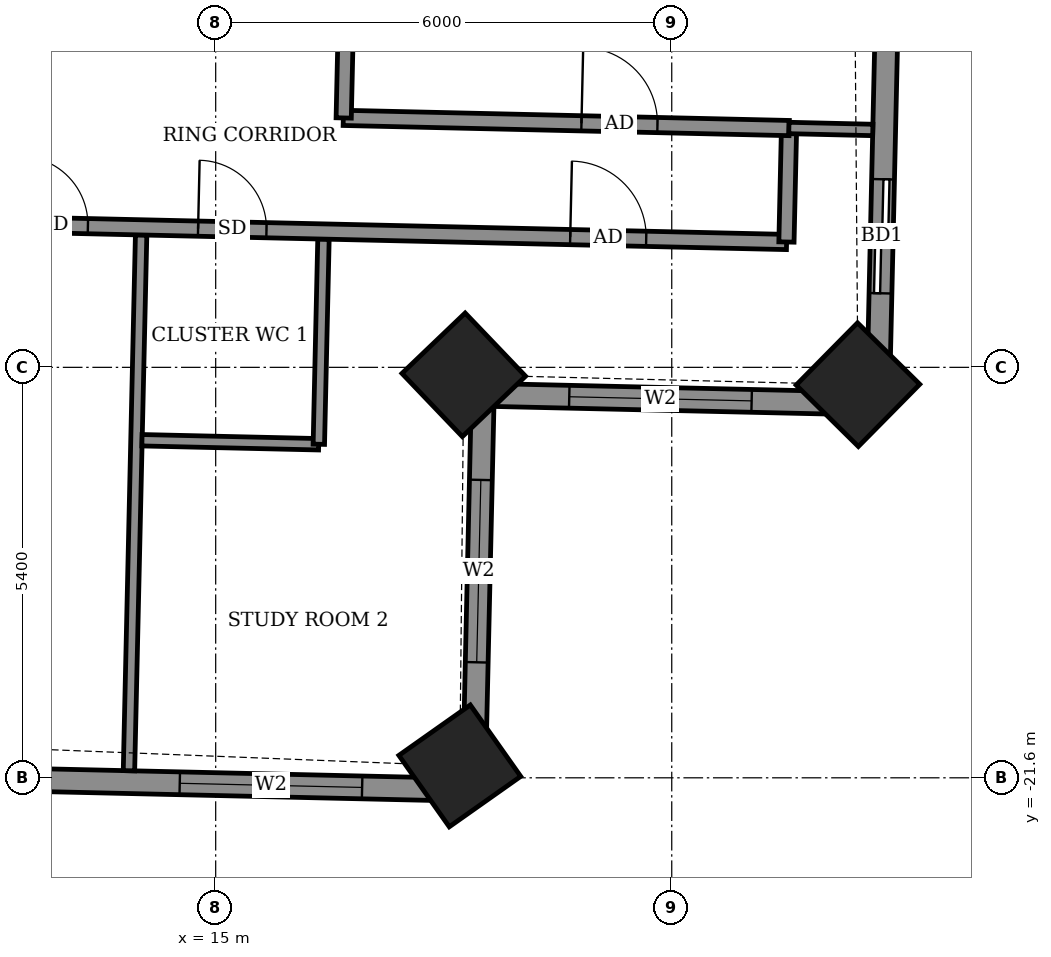
"""IFC4 building model, lengths in metres.
Left out: names, types, materials, properties, quantities, classifications, styles, units other than length and angle.
Written with IfcOpenShell. Run it as: python <this file> out.ifc"""

import sys

from ifc_helpers import new_model, si_unit, direction, frame, frame_2d, origin, origin_2d, place, context, subcontext, project, spatial, rectangle, extrude, element, fill, save


model = new_model("IFC4")
c1 = context("Model", 3, precision=1e-05, world=origin(), true_north=direction((0.0, 1.0)))
c2 = subcontext(c1, "Body", "Model", "MODEL_VIEW")
j1 = project(units=[si_unit("LENGTHUNIT", "METRE"), si_unit("PLANEANGLEUNIT", "RADIAN")], contexts=[c1])
p1 = place(None, origin())
s1 = spatial("IfcSite", under=j1, at=p1, CompositionType="ELEMENT")
p2 = place(p1, origin())
s2 = spatial("IfcBuilding", under=s1, at=p2, CompositionType="ELEMENT")
p3 = place(p2, frame((0.0, 0.0, 201.5)))
s3 = spatial("IfcBuildingStorey", under=s2, at=p3, CompositionType="ELEMENT", Elevation=201.5)
for number, where, z_axis, x_axis in (
    (1, (18.211, -21.443, -0.55), (0.0, 0.0, 1.0), (0.817, 0.577, 0.0)),
    (2, (18.264, -16.298, -0.55), (0.0, 0.0, 1.0), (0.723, 0.691, 0.0)),
    (3, (23.45, -16.428, -0.55), (0.0, 0.0, 1.0), (0.702, 0.712, 0.0)),
):
    element("IfcColumn", number, at=place(p3, frame(where, z_axis=z_axis, x_axis=x_axis)), inside=s3, PredefinedType="COLUMN", context=c2, shape_type="SweptSolid", body=[
        extrude(rectangle(XDim=1.15, YDim=1.15, at=origin_2d()), origin(), (0.0, 0.0, 1.0), 3.6),
    ])
p4 = place(p3, frame((23.713, -16.679, 0.0), z_axis=(0.0, 0.0, 1.0), x_axis=(0.02269451316, 0.999742446369, 0.0)))
e4 = element("IfcWall", 4, at=p4, inside=s3, PredefinedType="SOLIDWALL", context=c2, shape_type="SweptSolid", body=[
    extrude(rectangle(XDim=10.93, YDim=0.3, at=frame_2d((5.465, 0.0))), origin(), (0.0, 0.0, 1.0), 2.55),
])
p5 = place(p4, frame((1.454, 0.0, 0.0)))
e5 = element("IfcOpeningElement", 5, at=p5, cuts=e4, PredefinedType="OPENING", context=c2, shape_type="SweptSolid", body=[
    extrude(rectangle(XDim=1.5, YDim=2.4, at=frame_2d((0.75, 1.2))), frame((0.0, 0.16, 0.0), z_axis=(0.0, -1.0, 0.0), x_axis=(1.0, 0.0, 0.0)), (0.0, 0.0, 1.0), 0.32),
])
p6 = place(p4, frame((6.589, 0.0, 0.9)))
e6 = element("IfcOpeningElement", 6, at=p6, cuts=e4, PredefinedType="OPENING", context=c2, shape_type="SweptSolid", body=[
    extrude(rectangle(XDim=1.2, YDim=1.5, at=frame_2d((0.6, 0.75))), frame((0.0, 0.16, 0.0), z_axis=(0.0, -1.0, 0.0), x_axis=(1.0, 0.0, 0.0)), (0.0, 0.0, 1.0), 0.32),
])
p7 = place(p3, frame((-23.437, -20.81, 0.0), z_axis=(0.0, 0.0, 1.0), x_axis=(0.999742269115, -0.022702320244, 0.0)))
e7 = element("IfcWall", 7, at=p7, inside=s3, PredefinedType="SOLIDWALL", context=c2, shape_type="SweptSolid", body=[
    extrude(rectangle(XDim=41.844, YDim=0.3, at=frame_2d((20.922, 0.0))), origin(), (0.0, 0.0, 1.0), 2.55),
])
p8 = place(p7, frame((1.899, 0.0, 0.0)))
e8 = element("IfcOpeningElement", 8, at=p8, cuts=e7, PredefinedType="OPENING", context=c2, shape_type="SweptSolid", body=[
    extrude(rectangle(XDim=1.5, YDim=2.4, at=frame_2d((0.75, 1.2))), frame((0.0, 0.16, 0.0), z_axis=(0.0, -1.0, 0.0), x_axis=(1.0, 0.0, 0.0)), (0.0, 0.0, 1.0), 0.32),
])
p9 = place(p7, frame((7.575, 0.0, 0.0)))
e9 = element("IfcOpeningElement", 9, at=p9, cuts=e7, PredefinedType="OPENING", context=c2, shape_type="SweptSolid", body=[
    extrude(rectangle(XDim=1.2, YDim=2.4, at=frame_2d((0.6, 1.2))), frame((0.0, 0.16, 0.0), z_axis=(0.0, -1.0, 0.0), x_axis=(1.0, 0.0, 0.0)), (0.0, 0.0, 1.0), 0.32),
])
p10 = place(p7, frame((10.612, 0.0, 0.0)))
e10 = element("IfcOpeningElement", 10, at=p10, cuts=e7, PredefinedType="OPENING", context=c2, shape_type="SweptSolid", body=[
    extrude(rectangle(XDim=1.5, YDim=2.4, at=frame_2d((0.75, 1.2))), frame((0.0, 0.16, 0.0), z_axis=(0.0, -1.0, 0.0), x_axis=(1.0, 0.0, 0.0)), (0.0, 0.0, 1.0), 0.32),
])
p11 = place(p7, frame((15.762, 0.0, 0.0)))
e11 = element("IfcOpeningElement", 11, at=p11, cuts=e7, PredefinedType="OPENING", context=c2, shape_type="SweptSolid", body=[
    extrude(rectangle(XDim=1.5, YDim=2.4, at=frame_2d((0.75, 1.2))), frame((0.0, 0.16, 0.0), z_axis=(0.0, -1.0, 0.0), x_axis=(1.0, 0.0, 0.0)), (0.0, 0.0, 1.0), 0.32),
])
p12 = place(p7, frame((21.648, 0.0, 0.0)))
e12 = element("IfcOpeningElement", 12, at=p12, cuts=e7, PredefinedType="OPENING", context=c2, shape_type="SweptSolid", body=[
    extrude(rectangle(XDim=1.2, YDim=2.4, at=frame_2d((0.6, 1.2))), frame((0.0, 0.16, 0.0), z_axis=(0.0, -1.0, 0.0), x_axis=(1.0, 0.0, 0.0)), (0.0, 0.0, 1.0), 0.32),
])
p13 = place(p7, frame((24.685, 0.0, 0.0)))
e13 = element("IfcOpeningElement", 13, at=p13, cuts=e7, PredefinedType="OPENING", context=c2, shape_type="SweptSolid", body=[
    extrude(rectangle(XDim=1.5, YDim=2.4, at=frame_2d((0.75, 1.2))), frame((0.0, 0.16, 0.0), z_axis=(0.0, -1.0, 0.0), x_axis=(1.0, 0.0, 0.0)), (0.0, 0.0, 1.0), 0.32),
])
p14 = place(p7, frame((29.685, 0.0, 0.0)))
e14 = element("IfcOpeningElement", 14, at=p14, cuts=e7, PredefinedType="OPENING", context=c2, shape_type="SweptSolid", body=[
    extrude(rectangle(XDim=1.5, YDim=2.4, at=frame_2d((0.75, 1.2))), frame((0.0, 0.16, 0.0), z_axis=(0.0, -1.0, 0.0), x_axis=(1.0, 0.0, 0.0)), (0.0, 0.0, 1.0), 0.32),
])
p15 = place(p7, frame((33.022, 0.0, 0.0)))
e15 = element("IfcOpeningElement", 15, at=p15, cuts=e7, PredefinedType="OPENING", context=c2, shape_type="SweptSolid", body=[
    extrude(rectangle(XDim=1.2, YDim=2.4, at=frame_2d((0.6, 1.2))), frame((0.0, 0.16, 0.0), z_axis=(0.0, -1.0, 0.0), x_axis=(1.0, 0.0, 0.0)), (0.0, 0.0, 1.0), 0.32),
])
p16 = place(p7, frame((37.974, 0.0, 0.9)))
e16 = element("IfcOpeningElement", 16, at=p16, cuts=e7, PredefinedType="OPENING", context=c2, shape_type="SweptSolid", body=[
    extrude(rectangle(XDim=2.4, YDim=1.5, at=frame_2d((1.2, 0.75))), frame((0.0, 0.16, 0.0), z_axis=(0.0, -1.0, 0.0), x_axis=(1.0, 0.0, 0.0)), (0.0, 0.0, 1.0), 0.32),
])
p17 = place(p3, frame((18.396, -21.76, 0.0), z_axis=(0.0, 0.0, 1.0), x_axis=(0.022675548694, 0.99974287669, 0.0)))
e17 = element("IfcWall", 17, at=p17, inside=s3, PredefinedType="SOLIDWALL", context=c2, shape_type="SweptSolid", body=[
    extrude(rectangle(XDim=5.2, YDim=0.3, at=frame_2d((2.6, 0.0))), origin(), (0.0, 0.0, 1.0), 2.55),
])
p18 = place(p17, frame((1.68, 0.0, 0.9)))
e18 = element("IfcOpeningElement", 18, at=p18, cuts=e17, PredefinedType="OPENING", context=c2, shape_type="SweptSolid", body=[
    extrude(rectangle(XDim=2.4, YDim=1.5, at=frame_2d((1.2, 0.75))), frame((0.0, 0.16, 0.0), z_axis=(0.0, -1.0, 0.0), x_axis=(1.0, 0.0, 0.0)), (0.0, 0.0, 1.0), 0.32),
])
p19 = place(p3, frame((18.514, -16.561, 0.0), z_axis=(0.0, 0.0, 1.0), x_axis=(0.99974287669, -0.022675548694, 0.0)))
e19 = element("IfcWall", 19, at=p19, inside=s3, PredefinedType="SOLIDWALL", context=c2, shape_type="SweptSolid", body=[
    extrude(rectangle(XDim=5.2, YDim=0.3, at=frame_2d((2.6, 0.0))), origin(), (0.0, 0.0, 1.0), 2.55),
])
p20 = place(p19, frame((1.138, 0.0, 0.9)))
e20 = element("IfcOpeningElement", 20, at=p20, cuts=e19, PredefinedType="OPENING", context=c2, shape_type="SweptSolid", body=[
    extrude(rectangle(XDim=2.4, YDim=1.5, at=frame_2d((1.2, 0.75))), frame((0.0, 0.16, 0.0), z_axis=(0.0, -1.0, 0.0), x_axis=(1.0, 0.0, 0.0)), (0.0, 0.0, 1.0), 0.32),
])
p21 = place(p3, frame((13.859, -21.507, 0.0), z_axis=(0.0, 0.0, 1.0), x_axis=(0.022714326521, 0.999741996402, 0.0)))
e21 = element("IfcWall", 21, at=p21, inside=s3, PredefinedType="PARTITIONING", context=c2, shape_type="SweptSolid", body=[
    extrude(rectangle(XDim=7.051, YDim=0.15, at=frame_2d((3.525, 0.0))), origin(), (0.0, 0.0, 1.0), 2.55),
])
p22 = place(p3, frame((14.03, -17.159, 0.0), z_axis=(0.0, 0.0, 1.0), x_axis=(0.999740478815, -0.022781023197, 0.0)))
e22 = element("IfcWall", 22, at=p22, inside=s3, PredefinedType="PARTITIONING", context=c2, shape_type="SweptSolid", body=[
    extrude(rectangle(XDim=2.325, YDim=0.15, at=frame_2d((1.163, 0.0))), origin(), (0.0, 0.0, 1.0), 3.05),
])
p23 = place(p3, frame((16.357, -17.212, 0.0), z_axis=(0.0, 0.0, 1.0), x_axis=(0.02260842146, 0.999744396973, 0.0)))
e23 = element("IfcWall", 23, at=p23, inside=s3, PredefinedType="PARTITIONING", context=c2, shape_type="SweptSolid", body=[
    extrude(rectangle(XDim=2.7, YDim=0.15, at=frame_2d((1.35, 0.0))), origin(), (0.0, 0.0, 1.0), 3.05),
])
p24 = place(p3, frame((-26.421, -13.441, 0.0), z_axis=(0.0, 0.0, 1.0), x_axis=(0.999742754064, -0.022680954485, 0.0)))
e24 = element("IfcWall", 24, at=p24, inside=s3, PredefinedType="PARTITIONING", context=c2, shape_type="SweptSolid", body=[
    extrude(rectangle(XDim=48.945, YDim=0.2, at=frame_2d((24.472, 0.0))), origin(), (0.0, 0.0, 1.0), 3.05),
])
p25 = place(p24, frame((1.375, 0.0, 0.0)))
e25 = element("IfcOpeningElement", 25, at=p25, cuts=e24, PredefinedType="OPENING", context=c2, shape_type="SweptSolid", body=[
    extrude(rectangle(XDim=1.0, YDim=2.1, at=frame_2d((0.5, 1.05))), frame((0.0, 0.11, 0.0), z_axis=(0.0, -1.0, 0.0), x_axis=(1.0, 0.0, 0.0)), (0.0, 0.0, 1.0), 0.22),
])
p26 = place(p24, frame((6.0, 0.0, 0.0)))
e26 = element("IfcOpeningElement", 26, at=p26, cuts=e24, PredefinedType="OPENING", context=c2, shape_type="SweptSolid", body=[
    extrude(rectangle(XDim=0.9, YDim=2.1, at=frame_2d((0.45, 1.05))), frame((0.0, 0.11, 0.0), z_axis=(0.0, -1.0, 0.0), x_axis=(1.0, 0.0, 0.0)), (0.0, 0.0, 1.0), 0.22),
])
p27 = place(p24, frame((10.775, 0.0, 0.0)))
e27 = element("IfcOpeningElement", 27, at=p27, cuts=e24, PredefinedType="OPENING", context=c2, shape_type="SweptSolid", body=[
    extrude(rectangle(XDim=0.9, YDim=2.1, at=frame_2d((0.45, 1.05))), frame((0.0, 0.11, 0.0), z_axis=(0.0, -1.0, 0.0), x_axis=(1.0, 0.0, 0.0)), (0.0, 0.0, 1.0), 0.22),
])
p28 = place(p24, frame((13.05, 0.0, 0.0)))
e28 = element("IfcOpeningElement", 28, at=p28, cuts=e24, PredefinedType="OPENING", context=c2, shape_type="SweptSolid", body=[
    extrude(rectangle(XDim=0.9, YDim=2.1, at=frame_2d((0.45, 1.05))), frame((0.0, 0.11, 0.0), z_axis=(0.0, -1.0, 0.0), x_axis=(1.0, 0.0, 0.0)), (0.0, 0.0, 1.0), 0.22),
])
p29 = place(p24, frame((20.275, 0.0, 0.0)))
e29 = element("IfcOpeningElement", 29, at=p29, cuts=e24, PredefinedType="OPENING", context=c2, shape_type="SweptSolid", body=[
    extrude(rectangle(XDim=0.9, YDim=2.1, at=frame_2d((0.45, 1.05))), frame((0.0, 0.11, 0.0), z_axis=(0.0, -1.0, 0.0), x_axis=(1.0, 0.0, 0.0)), (0.0, 0.0, 1.0), 0.22),
])
p30 = place(p24, frame((22.525, 0.0, 0.0)))
e30 = element("IfcOpeningElement", 30, at=p30, cuts=e24, PredefinedType="OPENING", context=c2, shape_type="SweptSolid", body=[
    extrude(rectangle(XDim=0.9, YDim=2.1, at=frame_2d((0.45, 1.05))), frame((0.0, 0.11, 0.0), z_axis=(0.0, -1.0, 0.0), x_axis=(1.0, 0.0, 0.0)), (0.0, 0.0, 1.0), 0.22),
])
p31 = place(p24, frame((29.6, 0.0, 0.0)))
e31 = element("IfcOpeningElement", 31, at=p31, cuts=e24, PredefinedType="OPENING", context=c2, shape_type="SweptSolid", body=[
    extrude(rectangle(XDim=0.9, YDim=2.1, at=frame_2d((0.45, 1.05))), frame((0.0, 0.11, 0.0), z_axis=(0.0, -1.0, 0.0), x_axis=(1.0, 0.0, 0.0)), (0.0, 0.0, 1.0), 0.22),
])
p32 = place(p24, frame((31.875, 0.0, 0.0)))
e32 = element("IfcOpeningElement", 32, at=p32, cuts=e24, PredefinedType="OPENING", context=c2, shape_type="SweptSolid", body=[
    extrude(rectangle(XDim=0.9, YDim=2.1, at=frame_2d((0.45, 1.05))), frame((0.0, 0.11, 0.0), z_axis=(0.0, -1.0, 0.0), x_axis=(1.0, 0.0, 0.0)), (0.0, 0.0, 1.0), 0.22),
])
p33 = place(p24, frame((38.85, 0.0, 0.0)))
e33 = element("IfcOpeningElement", 33, at=p33, cuts=e24, PredefinedType="OPENING", context=c2, shape_type="SweptSolid", body=[
    extrude(rectangle(XDim=0.9, YDim=2.1, at=frame_2d((0.45, 1.05))), frame((0.0, 0.11, 0.0), z_axis=(0.0, -1.0, 0.0), x_axis=(1.0, 0.0, 0.0)), (0.0, 0.0, 1.0), 0.22),
])
p34 = place(p24, frame((46.097, 0.0, 0.0)))
e34 = element("IfcOpeningElement", 34, at=p34, cuts=e24, PredefinedType="OPENING", context=c2, shape_type="SweptSolid", body=[
    extrude(rectangle(XDim=1.0, YDim=2.1, at=frame_2d((0.5, 1.05))), frame((0.0, 0.11, 0.0), z_axis=(0.0, -1.0, 0.0), x_axis=(1.0, 0.0, 0.0)), (0.0, 0.0, 1.0), 0.22),
])
p35 = place(p24, frame((41.2, 0.0, 0.0)))
e35 = element("IfcOpeningElement", 35, at=p35, cuts=e24, PredefinedType="OPENING", context=c2, shape_type="SweptSolid", body=[
    extrude(rectangle(XDim=0.9, YDim=2.1, at=frame_2d((0.45, 1.05))), frame((0.0, 0.11, 0.0), z_axis=(0.0, -1.0, 0.0), x_axis=(1.0, 0.0, 0.0)), (0.0, 0.0, 1.0), 0.22),
])
p36 = place(p3, frame((22.509, -14.551, 0.0), z_axis=(0.0, 0.0, 1.0), x_axis=(0.022632637625, 0.99974384905, 0.0)))
e36 = element("IfcWall", 36, at=p36, inside=s3, PredefinedType="PARTITIONING", context=c2, shape_type="SweptSolid", body=[
    extrude(rectangle(XDim=1.5, YDim=0.2, at=frame_2d((0.75, 0.0))), origin(), (0.0, 0.0, 1.0), 3.05),
])
p37 = place(p3, frame((16.679, -12.918, 0.0), z_axis=(0.0, 0.0, 1.0), x_axis=(0.999739057042, -0.022843332181, 0.0)))
e37 = element("IfcWall", 37, at=p37, inside=s3, PredefinedType="PARTITIONING", context=c2, shape_type="SweptSolid", body=[
    extrude(rectangle(XDim=5.867, YDim=0.2, at=frame_2d((2.934, 0.0))), origin(), (0.0, 0.0, 1.0), 3.05),
])
p38 = place(p37, frame((3.134, 0.0, 0.0)))
e38 = element("IfcOpeningElement", 38, at=p38, cuts=e37, PredefinedType="OPENING", context=c2, shape_type="SweptSolid", body=[
    extrude(rectangle(XDim=1.0, YDim=2.1, at=frame_2d((0.5, 1.05))), frame((0.0, 0.11, 0.0), z_axis=(0.0, -1.0, 0.0), x_axis=(1.0, 0.0, 0.0)), (0.0, 0.0, 1.0), 0.22),
])
p39 = place(p3, frame((16.684, -12.919, 0.0), z_axis=(0.0, 0.0, 1.0), x_axis=(0.022667483124, 0.999743059595, 0.0)))
e39 = element("IfcWall", 39, at=p39, inside=s3, PredefinedType="PARTITIONING", context=c2, shape_type="SweptSolid", body=[
    extrude(rectangle(XDim=5.245, YDim=0.2, at=frame_2d((2.623, 0.0))), origin(), (0.0, 0.0, 1.0), 3.05),
])
p40 = place(p3, frame((22.541, -13.051, 0.0), z_axis=(0.0, 0.0, 1.0), x_axis=(0.999725373977, -0.023434517833, 0.0)))
e40 = element("IfcWall", 40, at=p40, inside=s3, PredefinedType="PARTITIONING", context=c2, shape_type="SweptSolid", body=[
    extrude(rectangle(XDim=1.104, YDim=0.15, at=frame_2d((0.552, 0.0))), origin(), (0.0, 0.0, 1.0), 2.55),
])
p41 = place(p5, origin())
e41 = element("IfcDoor", 41, at=p41, inside=s3, OperationType="SLIDING_TO_LEFT", PredefinedType="DOOR", context=c2, shape_type="SweptSolid", body=[
    extrude(rectangle(XDim=1.5, YDim=2.4, at=frame_2d((0.75, 1.2))), frame((0.0, 0.025, 0.0), z_axis=(0.0, -1.0, 0.0), x_axis=(1.0, 0.0, 0.0)), (0.0, 0.0, 1.0), 0.05),
])
fill(e5, e41)
p42 = place(p16, origin())
e42 = element("IfcWindow", 42, at=p42, inside=s3, PartitioningType="DOUBLE_PANEL_VERTICAL", PredefinedType="WINDOW", context=c2, shape_type="SweptSolid", body=[
    extrude(rectangle(XDim=2.4, YDim=1.5, at=frame_2d((1.2, 0.75))), frame((0.0, 0.03, 0.0), z_axis=(0.0, -1.0, 0.0), x_axis=(1.0, 0.0, 0.0)), (0.0, 0.0, 1.0), 0.06),
])
fill(e16, e42)
p43 = place(p18, origin())
e43 = element("IfcWindow", 43, at=p43, inside=s3, PartitioningType="DOUBLE_PANEL_VERTICAL", PredefinedType="WINDOW", context=c2, shape_type="SweptSolid", body=[
    extrude(rectangle(XDim=2.4, YDim=1.5, at=frame_2d((1.2, 0.75))), frame((0.0, 0.03, 0.0), z_axis=(0.0, -1.0, 0.0), x_axis=(1.0, 0.0, 0.0)), (0.0, 0.0, 1.0), 0.06),
])
fill(e18, e43)
p44 = place(p20, origin())
e44 = element("IfcWindow", 44, at=p44, inside=s3, PartitioningType="DOUBLE_PANEL_VERTICAL", PredefinedType="WINDOW", context=c2, shape_type="SweptSolid", body=[
    extrude(rectangle(XDim=2.4, YDim=1.5, at=frame_2d((1.2, 0.75))), frame((0.0, 0.03, 0.0), z_axis=(0.0, -1.0, 0.0), x_axis=(1.0, 0.0, 0.0)), (0.0, 0.0, 1.0), 0.06),
])
fill(e20, e44)
p45 = place(p33, origin())
e45 = element("IfcDoor", 45, at=p45, inside=s3, OperationType="SINGLE_SWING_LEFT", PredefinedType="DOOR", context=c2, shape_type="SweptSolid", body=[
    extrude(rectangle(XDim=0.9, YDim=2.1, at=frame_2d((0.45, 1.05))), frame((0.0, 0.025, 0.0), z_axis=(0.0, -1.0, 0.0), x_axis=(1.0, 0.0, 0.0)), (0.0, 0.0, 1.0), 0.05),
])
fill(e33, e45)
p46 = place(p34, origin())
e46 = element("IfcDoor", 46, at=p46, inside=s3, OperationType="SINGLE_SWING_RIGHT", PredefinedType="DOOR", context=c2, shape_type="SweptSolid", body=[
    extrude(rectangle(XDim=1.0, YDim=2.1, at=frame_2d((0.5, 1.05))), frame((0.0, 0.025, 0.0), z_axis=(0.0, -1.0, 0.0), x_axis=(1.0, 0.0, 0.0)), (0.0, 0.0, 1.0), 0.05),
])
fill(e34, e46)
p47 = place(p35, origin())
e47 = element("IfcDoor", 47, at=p47, inside=s3, OperationType="SINGLE_SWING_RIGHT", PredefinedType="DOOR", context=c2, shape_type="SweptSolid", body=[
    extrude(rectangle(XDim=0.9, YDim=2.1, at=frame_2d((0.45, 1.05))), frame((0.0, 0.025, 0.0), z_axis=(0.0, -1.0, 0.0), x_axis=(1.0, 0.0, 0.0)), (0.0, 0.0, 1.0), 0.05),
])
fill(e35, e47)
p48 = place(p38, origin())
e48 = element("IfcDoor", 48, at=p48, inside=s3, OperationType="SINGLE_SWING_LEFT", PredefinedType="DOOR", context=c2, shape_type="SweptSolid", body=[
    extrude(rectangle(XDim=1.0, YDim=2.1, at=frame_2d((0.5, 1.05))), frame((0.0, 0.025, 0.0), z_axis=(0.0, -1.0, 0.0), x_axis=(1.0, 0.0, 0.0)), (0.0, 0.0, 1.0), 0.05),
])
fill(e38, e48)
save(model, sys.argv[1])
